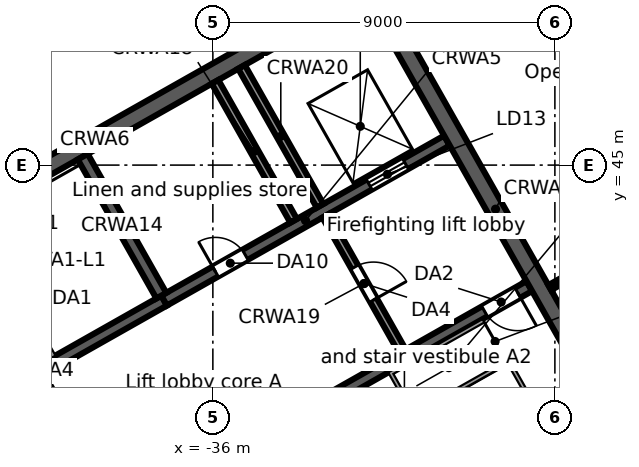
"""IFC4 building model, lengths in metres.
Left out: names, types, materials, properties, quantities, classifications, styles, units other than length and angle.
Written with IfcOpenShell. Run it as: python <this file> out.ifc"""

import sys

from ifc_helpers import new_model, si_unit, direction, frame, frame_2d, origin, place, context, subcontext, project, spatial, rectangle, extrude, element, fill, save


model = new_model("IFC4")
c1 = context("Model", 3, precision=1e-05, world=origin(), true_north=direction((0.0, 1.0)))
c2 = subcontext(c1, "Body", "Model", "MODEL_VIEW")
j1 = project(units=[si_unit("LENGTHUNIT", "METRE"), si_unit("PLANEANGLEUNIT", "RADIAN")], contexts=[c1])
p1 = place(None, origin())
s1 = spatial("IfcSite", under=j1, at=p1, CompositionType="ELEMENT")
p2 = place(p1, origin())
s2 = spatial("IfcBuilding", under=s1, at=p2, CompositionType="ELEMENT")
p3 = place(p2, frame((0.0, 0.0, 238.7)))
s3 = spatial("IfcBuildingStorey", under=s2, at=p3, CompositionType="ELEMENT", Elevation=238.7)
p4 = place(p3, frame((-0.046, 47.974, 0.0), z_axis=(0.0, 0.0, 1.0), x_axis=(-0.870356579543, -0.492421998337, 0.0)))
e1 = element("IfcWall", 1, at=p4, inside=s3, PredefinedType="STANDARD", context=c2, shape_type="SweptSolid", body=[
    extrude(rectangle(XDim=43.754, YDim=0.25, at=frame_2d((21.877, 0.0))), origin(), (0.0, 0.0, 1.0), 3.62),
])
p5 = place(p4, frame((41.061, 0.0, 0.8)))
e2 = element("IfcOpeningElement", 2, at=p5, cuts=e1, PredefinedType="OPENING", context=c2, shape_type="SweptSolid", body=[
    extrude(rectangle(XDim=2.4, YDim=2.2, at=frame_2d((1.2, 1.1))), frame((0.0, 0.135, 0.0), z_axis=(0.0, -1.0, 0.0), x_axis=(1.0, 0.0, 0.0)), (0.0, 0.0, 1.0), 0.27),
])
p6 = place(p4, frame((38.443, 0.0, 0.0)))
e3 = element("IfcOpeningElement", 3, at=p6, cuts=e1, PredefinedType="OPENING", context=c2, shape_type="SweptSolid", body=[
    extrude(rectangle(XDim=1.8, YDim=2.4, at=frame_2d((0.9, 1.2))), frame((0.0, 0.135, 0.0), z_axis=(0.0, -1.0, 0.0), x_axis=(1.0, 0.0, 0.0)), (0.0, 0.0, 1.0), 0.27),
])
p7 = place(p4, frame((35.225, 0.0, 0.8)))
e4 = element("IfcOpeningElement", 4, at=p7, cuts=e1, PredefinedType="OPENING", context=c2, shape_type="SweptSolid", body=[
    extrude(rectangle(XDim=2.4, YDim=2.2, at=frame_2d((1.2, 1.1))), frame((0.0, 0.135, 0.0), z_axis=(0.0, -1.0, 0.0), x_axis=(1.0, 0.0, 0.0)), (0.0, 0.0, 1.0), 0.27),
])
p8 = place(p4, frame((32.307, 0.0, 0.8)))
e5 = element("IfcOpeningElement", 5, at=p8, cuts=e1, PredefinedType="OPENING", context=c2, shape_type="SweptSolid", body=[
    extrude(rectangle(XDim=2.4, YDim=2.2, at=frame_2d((1.2, 1.1))), frame((0.0, 0.135, 0.0), z_axis=(0.0, -1.0, 0.0), x_axis=(1.0, 0.0, 0.0)), (0.0, 0.0, 1.0), 0.27),
])
p9 = place(p4, frame((29.688, 0.0, 0.0)))
e6 = element("IfcOpeningElement", 6, at=p9, cuts=e1, PredefinedType="OPENING", context=c2, shape_type="SweptSolid", body=[
    extrude(rectangle(XDim=1.8, YDim=2.4, at=frame_2d((0.9, 1.2))), frame((0.0, 0.135, 0.0), z_axis=(0.0, -1.0, 0.0), x_axis=(1.0, 0.0, 0.0)), (0.0, 0.0, 1.0), 0.27),
])
p10 = place(p4, frame((26.47, 0.0, 0.8)))
e7 = element("IfcOpeningElement", 7, at=p10, cuts=e1, PredefinedType="OPENING", context=c2, shape_type="SweptSolid", body=[
    extrude(rectangle(XDim=2.4, YDim=2.2, at=frame_2d((1.2, 1.1))), frame((0.0, 0.135, 0.0), z_axis=(0.0, -1.0, 0.0), x_axis=(1.0, 0.0, 0.0)), (0.0, 0.0, 1.0), 0.27),
])
p11 = place(p4, frame((23.552, 0.0, 0.8)))
e8 = element("IfcOpeningElement", 8, at=p11, cuts=e1, PredefinedType="OPENING", context=c2, shape_type="SweptSolid", body=[
    extrude(rectangle(XDim=2.4, YDim=2.2, at=frame_2d((1.2, 1.1))), frame((0.0, 0.135, 0.0), z_axis=(0.0, -1.0, 0.0), x_axis=(1.0, 0.0, 0.0)), (0.0, 0.0, 1.0), 0.27),
])
p12 = place(p4, frame((20.934, 0.0, 0.0)))
e9 = element("IfcOpeningElement", 9, at=p12, cuts=e1, PredefinedType="OPENING", context=c2, shape_type="SweptSolid", body=[
    extrude(rectangle(XDim=1.8, YDim=2.4, at=frame_2d((0.9, 1.2))), frame((0.0, 0.135, 0.0), z_axis=(0.0, -1.0, 0.0), x_axis=(1.0, 0.0, 0.0)), (0.0, 0.0, 1.0), 0.27),
])
p13 = place(p4, frame((17.716, 0.0, 0.8)))
e10 = element("IfcOpeningElement", 10, at=p13, cuts=e1, PredefinedType="OPENING", context=c2, shape_type="SweptSolid", body=[
    extrude(rectangle(XDim=2.4, YDim=2.2, at=frame_2d((1.2, 1.1))), frame((0.0, 0.135, 0.0), z_axis=(0.0, -1.0, 0.0), x_axis=(1.0, 0.0, 0.0)), (0.0, 0.0, 1.0), 0.27),
])
p14 = place(p4, frame((14.798, 0.0, 0.8)))
e11 = element("IfcOpeningElement", 11, at=p14, cuts=e1, PredefinedType="OPENING", context=c2, shape_type="SweptSolid", body=[
    extrude(rectangle(XDim=2.4, YDim=2.2, at=frame_2d((1.2, 1.1))), frame((0.0, 0.135, 0.0), z_axis=(0.0, -1.0, 0.0), x_axis=(1.0, 0.0, 0.0)), (0.0, 0.0, 1.0), 0.27),
])
p15 = place(p4, frame((12.179, 0.0, 0.0)))
e12 = element("IfcOpeningElement", 12, at=p15, cuts=e1, PredefinedType="OPENING", context=c2, shape_type="SweptSolid", body=[
    extrude(rectangle(XDim=1.8, YDim=2.4, at=frame_2d((0.9, 1.2))), frame((0.0, 0.135, 0.0), z_axis=(0.0, -1.0, 0.0), x_axis=(1.0, 0.0, 0.0)), (0.0, 0.0, 1.0), 0.27),
])
p16 = place(p4, frame((8.961, 0.0, 0.8)))
e13 = element("IfcOpeningElement", 13, at=p16, cuts=e1, PredefinedType="OPENING", context=c2, shape_type="SweptSolid", body=[
    extrude(rectangle(XDim=2.4, YDim=2.2, at=frame_2d((1.2, 1.1))), frame((0.0, 0.135, 0.0), z_axis=(0.0, -1.0, 0.0), x_axis=(1.0, 0.0, 0.0)), (0.0, 0.0, 1.0), 0.27),
])
p17 = place(p4, frame((6.043, 0.0, 0.8)))
e14 = element("IfcOpeningElement", 14, at=p17, cuts=e1, PredefinedType="OPENING", context=c2, shape_type="SweptSolid", body=[
    extrude(rectangle(XDim=2.4, YDim=2.2, at=frame_2d((1.2, 1.1))), frame((0.0, 0.135, 0.0), z_axis=(0.0, -1.0, 0.0), x_axis=(1.0, 0.0, 0.0)), (0.0, 0.0, 1.0), 0.27),
])
p18 = place(p4, frame((3.425, 0.0, 0.0)))
e15 = element("IfcOpeningElement", 15, at=p18, cuts=e1, PredefinedType="OPENING", context=c2, shape_type="SweptSolid", body=[
    extrude(rectangle(XDim=1.8, YDim=2.4, at=frame_2d((0.9, 1.2))), frame((0.0, 0.135, 0.0), z_axis=(0.0, -1.0, 0.0), x_axis=(1.0, 0.0, 0.0)), (0.0, 0.0, 1.0), 0.27),
])
p19 = place(p4, frame((0.207, 0.0, 0.8)))
e16 = element("IfcOpeningElement", 16, at=p19, cuts=e1, PredefinedType="OPENING", context=c2, shape_type="SweptSolid", body=[
    extrude(rectangle(XDim=2.4, YDim=2.2, at=frame_2d((1.2, 1.1))), frame((0.0, 0.135, 0.0), z_axis=(0.0, -1.0, 0.0), x_axis=(1.0, 0.0, 0.0)), (0.0, 0.0, 1.0), 0.27),
])
p20 = place(p3, frame((-58.732, 38.771, 0.0), z_axis=(0.0, 0.0, 1.0), x_axis=(0.870354824205, 0.492425100887, 0.0)))
e17 = element("IfcWall", 17, at=p20, inside=s3, PredefinedType="STANDARD", context=c2, shape_type="SweptSolid", body=[
    extrude(rectangle(XDim=64.006, YDim=0.25, at=frame_2d((32.003, 0.0))), origin(), (0.0, 0.0, 1.0), 3.62),
])
p21 = place(p20, frame((61.259, 0.0, 0.8)))
e18 = element("IfcOpeningElement", 18, at=p21, cuts=e17, PredefinedType="OPENING", context=c2, shape_type="SweptSolid", body=[
    extrude(rectangle(XDim=2.4, YDim=2.2, at=frame_2d((1.2, 1.1))), frame((0.0, 0.135, 0.0), z_axis=(0.0, -1.0, 0.0), x_axis=(1.0, 0.0, 0.0)), (0.0, 0.0, 1.0), 0.27),
])
p22 = place(p20, frame((58.216, 0.0, 0.8)))
e19 = element("IfcOpeningElement", 19, at=p22, cuts=e17, PredefinedType="OPENING", context=c2, shape_type="SweptSolid", body=[
    extrude(rectangle(XDim=2.4, YDim=2.2, at=frame_2d((1.2, 1.1))), frame((0.0, 0.135, 0.0), z_axis=(0.0, -1.0, 0.0), x_axis=(1.0, 0.0, 0.0)), (0.0, 0.0, 1.0), 0.27),
])
p23 = place(p20, frame((55.173, 0.0, 0.8)))
e20 = element("IfcOpeningElement", 20, at=p23, cuts=e17, PredefinedType="OPENING", context=c2, shape_type="SweptSolid", body=[
    extrude(rectangle(XDim=2.4, YDim=2.2, at=frame_2d((1.2, 1.1))), frame((0.0, 0.135, 0.0), z_axis=(0.0, -1.0, 0.0), x_axis=(1.0, 0.0, 0.0)), (0.0, 0.0, 1.0), 0.27),
])
p24 = place(p20, frame((52.129, 0.0, 0.8)))
e21 = element("IfcOpeningElement", 21, at=p24, cuts=e17, PredefinedType="OPENING", context=c2, shape_type="SweptSolid", body=[
    extrude(rectangle(XDim=2.4, YDim=2.2, at=frame_2d((1.2, 1.1))), frame((0.0, 0.135, 0.0), z_axis=(0.0, -1.0, 0.0), x_axis=(1.0, 0.0, 0.0)), (0.0, 0.0, 1.0), 0.27),
])
p25 = place(p20, frame((49.086, 0.0, 0.8)))
e22 = element("IfcOpeningElement", 22, at=p25, cuts=e17, PredefinedType="OPENING", context=c2, shape_type="SweptSolid", body=[
    extrude(rectangle(XDim=2.4, YDim=2.2, at=frame_2d((1.2, 1.1))), frame((0.0, 0.135, 0.0), z_axis=(0.0, -1.0, 0.0), x_axis=(1.0, 0.0, 0.0)), (0.0, 0.0, 1.0), 0.27),
])
p26 = place(p20, frame((46.043, 0.0, 0.8)))
e23 = element("IfcOpeningElement", 23, at=p26, cuts=e17, PredefinedType="OPENING", context=c2, shape_type="SweptSolid", body=[
    extrude(rectangle(XDim=2.4, YDim=2.2, at=frame_2d((1.2, 1.1))), frame((0.0, 0.135, 0.0), z_axis=(0.0, -1.0, 0.0), x_axis=(1.0, 0.0, 0.0)), (0.0, 0.0, 1.0), 0.27),
])
p27 = place(p20, frame((43.0, 0.0, 0.8)))
e24 = element("IfcOpeningElement", 24, at=p27, cuts=e17, PredefinedType="OPENING", context=c2, shape_type="SweptSolid", body=[
    extrude(rectangle(XDim=2.4, YDim=2.2, at=frame_2d((1.2, 1.1))), frame((0.0, 0.135, 0.0), z_axis=(0.0, -1.0, 0.0), x_axis=(1.0, 0.0, 0.0)), (0.0, 0.0, 1.0), 0.27),
])
p28 = place(p20, frame((39.956, 0.0, 0.8)))
e25 = element("IfcOpeningElement", 25, at=p28, cuts=e17, PredefinedType="OPENING", context=c2, shape_type="SweptSolid", body=[
    extrude(rectangle(XDim=2.4, YDim=2.2, at=frame_2d((1.2, 1.1))), frame((0.0, 0.135, 0.0), z_axis=(0.0, -1.0, 0.0), x_axis=(1.0, 0.0, 0.0)), (0.0, 0.0, 1.0), 0.27),
])
p29 = place(p20, frame((36.913, 0.0, 0.8)))
e26 = element("IfcOpeningElement", 26, at=p29, cuts=e17, PredefinedType="OPENING", context=c2, shape_type="SweptSolid", body=[
    extrude(rectangle(XDim=2.4, YDim=2.2, at=frame_2d((1.2, 1.1))), frame((0.0, 0.135, 0.0), z_axis=(0.0, -1.0, 0.0), x_axis=(1.0, 0.0, 0.0)), (0.0, 0.0, 1.0), 0.27),
])
p30 = place(p20, frame((33.87, 0.0, 0.8)))
e27 = element("IfcOpeningElement", 27, at=p30, cuts=e17, PredefinedType="OPENING", context=c2, shape_type="SweptSolid", body=[
    extrude(rectangle(XDim=2.4, YDim=2.2, at=frame_2d((1.2, 1.1))), frame((0.0, 0.135, 0.0), z_axis=(0.0, -1.0, 0.0), x_axis=(1.0, 0.0, 0.0)), (0.0, 0.0, 1.0), 0.27),
])
p31 = place(p20, frame((30.826, 0.0, 0.8)))
e28 = element("IfcOpeningElement", 28, at=p31, cuts=e17, PredefinedType="OPENING", context=c2, shape_type="SweptSolid", body=[
    extrude(rectangle(XDim=2.4, YDim=2.2, at=frame_2d((1.2, 1.1))), frame((0.0, 0.135, 0.0), z_axis=(0.0, -1.0, 0.0), x_axis=(1.0, 0.0, 0.0)), (0.0, 0.0, 1.0), 0.27),
])
p32 = place(p20, frame((27.783, 0.0, 0.8)))
e29 = element("IfcOpeningElement", 29, at=p32, cuts=e17, PredefinedType="OPENING", context=c2, shape_type="SweptSolid", body=[
    extrude(rectangle(XDim=2.4, YDim=2.2, at=frame_2d((1.2, 1.1))), frame((0.0, 0.135, 0.0), z_axis=(0.0, -1.0, 0.0), x_axis=(1.0, 0.0, 0.0)), (0.0, 0.0, 1.0), 0.27),
])
p33 = place(p20, frame((24.74, 0.0, 0.8)))
e30 = element("IfcOpeningElement", 30, at=p33, cuts=e17, PredefinedType="OPENING", context=c2, shape_type="SweptSolid", body=[
    extrude(rectangle(XDim=2.4, YDim=2.2, at=frame_2d((1.2, 1.1))), frame((0.0, 0.135, 0.0), z_axis=(0.0, -1.0, 0.0), x_axis=(1.0, 0.0, 0.0)), (0.0, 0.0, 1.0), 0.27),
])
p34 = place(p20, frame((21.696, 0.0, 0.8)))
e31 = element("IfcOpeningElement", 31, at=p34, cuts=e17, PredefinedType="OPENING", context=c2, shape_type="SweptSolid", body=[
    extrude(rectangle(XDim=2.4, YDim=2.2, at=frame_2d((1.2, 1.1))), frame((0.0, 0.135, 0.0), z_axis=(0.0, -1.0, 0.0), x_axis=(1.0, 0.0, 0.0)), (0.0, 0.0, 1.0), 0.27),
])
p35 = place(p20, frame((18.653, 0.0, 0.8)))
e32 = element("IfcOpeningElement", 32, at=p35, cuts=e17, PredefinedType="OPENING", context=c2, shape_type="SweptSolid", body=[
    extrude(rectangle(XDim=2.4, YDim=2.2, at=frame_2d((1.2, 1.1))), frame((0.0, 0.135, 0.0), z_axis=(0.0, -1.0, 0.0), x_axis=(1.0, 0.0, 0.0)), (0.0, 0.0, 1.0), 0.27),
])
p36 = place(p20, frame((15.61, 0.0, 0.8)))
e33 = element("IfcOpeningElement", 33, at=p36, cuts=e17, PredefinedType="OPENING", context=c2, shape_type="SweptSolid", body=[
    extrude(rectangle(XDim=2.4, YDim=2.2, at=frame_2d((1.2, 1.1))), frame((0.0, 0.135, 0.0), z_axis=(0.0, -1.0, 0.0), x_axis=(1.0, 0.0, 0.0)), (0.0, 0.0, 1.0), 0.27),
])
p37 = place(p20, frame((12.567, 0.0, 0.8)))
e34 = element("IfcOpeningElement", 34, at=p37, cuts=e17, PredefinedType="OPENING", context=c2, shape_type="SweptSolid", body=[
    extrude(rectangle(XDim=2.4, YDim=2.2, at=frame_2d((1.2, 1.1))), frame((0.0, 0.135, 0.0), z_axis=(0.0, -1.0, 0.0), x_axis=(1.0, 0.0, 0.0)), (0.0, 0.0, 1.0), 0.27),
])
p38 = place(p20, frame((9.523, 0.0, 0.8)))
e35 = element("IfcOpeningElement", 35, at=p38, cuts=e17, PredefinedType="OPENING", context=c2, shape_type="SweptSolid", body=[
    extrude(rectangle(XDim=2.4, YDim=2.2, at=frame_2d((1.2, 1.1))), frame((0.0, 0.135, 0.0), z_axis=(0.0, -1.0, 0.0), x_axis=(1.0, 0.0, 0.0)), (0.0, 0.0, 1.0), 0.27),
])
p39 = place(p20, frame((6.48, 0.0, 0.8)))
e36 = element("IfcOpeningElement", 36, at=p39, cuts=e17, PredefinedType="OPENING", context=c2, shape_type="SweptSolid", body=[
    extrude(rectangle(XDim=2.4, YDim=2.2, at=frame_2d((1.2, 1.1))), frame((0.0, 0.135, 0.0), z_axis=(0.0, -1.0, 0.0), x_axis=(1.0, 0.0, 0.0)), (0.0, 0.0, 1.0), 0.27),
])
p40 = place(p20, frame((3.437, 0.0, 0.8)))
e37 = element("IfcOpeningElement", 37, at=p40, cuts=e17, PredefinedType="OPENING", context=c2, shape_type="SweptSolid", body=[
    extrude(rectangle(XDim=2.4, YDim=2.2, at=frame_2d((1.2, 1.1))), frame((0.0, 0.135, 0.0), z_axis=(0.0, -1.0, 0.0), x_axis=(1.0, 0.0, 0.0)), (0.0, 0.0, 1.0), 0.27),
])
p41 = place(p20, frame((0.393, 0.0, 0.8)))
e38 = element("IfcOpeningElement", 38, at=p41, cuts=e17, PredefinedType="OPENING", context=c2, shape_type="SweptSolid", body=[
    extrude(rectangle(XDim=2.4, YDim=2.2, at=frame_2d((1.2, 1.1))), frame((0.0, 0.135, 0.0), z_axis=(0.0, -1.0, 0.0), x_axis=(1.0, 0.0, 0.0)), (0.0, 0.0, 1.0), 0.27),
])
p42 = place(p3, frame((-34.245, 38.097, 0.0), z_axis=(0.0, 0.0, 1.0), x_axis=(0.870360409231, 0.492415229297, 0.0)))
e39 = element("IfcWall", 39, at=p42, inside=s3, PredefinedType="SOLIDWALL", context=c2, shape_type="SweptSolid", body=[
    extrude(rectangle(XDim=7.55, YDim=0.3, at=frame_2d((3.775, 0.0))), origin(), (0.0, 0.0, 1.0), 3.62),
])
p43 = place(p42, frame((6.2, 0.0, 0.0)))
e40 = element("IfcOpeningElement", 40, at=p43, cuts=e39, PredefinedType="OPENING", context=c2, shape_type="SweptSolid", body=[
    extrude(rectangle(XDim=1.0, YDim=2.1, at=frame_2d((0.5, 1.05))), frame((0.0, 0.16, 0.0), z_axis=(0.0, -1.0, 0.0), x_axis=(1.0, 0.0, 0.0)), (0.0, 0.0, 1.0), 0.32),
])
p44 = place(p3, frame((-43.853, 37.717, 0.0), z_axis=(0.0, 0.0, 1.0), x_axis=(0.870360409231, 0.492415229297, 0.0)))
e41 = element("IfcWall", 41, at=p44, inside=s3, PredefinedType="SOLIDWALL", context=c2, shape_type="SweptSolid", body=[
    extrude(rectangle(XDim=7.55, YDim=0.3, at=frame_2d((3.775, 0.0))), origin(), (0.0, 0.0, 1.0), 3.62),
])
p45 = place(p44, frame((0.35, 0.0, 0.0)))
e42 = element("IfcOpeningElement", 42, at=p45, cuts=e41, PredefinedType="OPENING", context=c2, shape_type="SweptSolid", body=[
    extrude(rectangle(XDim=1.0, YDim=2.1, at=frame_2d((0.5, 1.05))), frame((0.0, 0.16, 0.0), z_axis=(0.0, -1.0, 0.0), x_axis=(1.0, 0.0, 0.0)), (0.0, 0.0, 1.0), 0.32),
])
p46 = place(p3, frame((-37.282, 41.435, 0.0), z_axis=(0.0, 0.0, 1.0), x_axis=(0.870352688754, 0.492428875248, 0.0)))
e43 = element("IfcWall", 43, at=p46, inside=s3, PredefinedType="SOLIDWALL", context=c2, shape_type="SweptSolid", body=[
    extrude(rectangle(XDim=8.55, YDim=0.3, at=frame_2d((4.275, 0.0))), origin(), (0.0, 0.0, 1.0), 3.62),
])
p47 = place(p46, frame((6.2, 0.0, 0.0)))
e44 = element("IfcOpeningElement", 44, at=p47, cuts=e43, PredefinedType="OPENING", context=c2, shape_type="SweptSolid", body=[
    extrude(rectangle(XDim=1.1, YDim=2.1, at=frame_2d((0.55, 1.05))), frame((0.0, 0.16, 0.0), z_axis=(0.0, -1.0, 0.0), x_axis=(1.0, 0.0, 0.0)), (0.0, 0.0, 1.0), 0.32),
])
p48 = place(p46, frame((1.55, 0.0, 0.0)))
e45 = element("IfcOpeningElement", 45, at=p48, cuts=e43, PredefinedType="OPENING", context=c2, shape_type="SweptSolid", body=[
    extrude(rectangle(XDim=0.9, YDim=2.1, at=frame_2d((0.45, 1.05))), frame((0.0, 0.16, 0.0), z_axis=(0.0, -1.0, 0.0), x_axis=(1.0, 0.0, 0.0)), (0.0, 0.0, 1.0), 0.32),
])
p49 = place(p3, frame((-46.498, 41.477, 0.0), z_axis=(0.0, 0.0, 1.0), x_axis=(0.870359753402, 0.492416388494, 0.0)))
e46 = element("IfcWall", 46, at=p49, inside=s3, PredefinedType="SOLIDWALL", context=c2, shape_type="SweptSolid", body=[
    extrude(rectangle(XDim=17.0, YDim=0.45, at=frame_2d((8.5, 0.0))), origin(), (0.0, 0.0, 1.0), 3.62),
])
p50 = place(p3, frame((-46.191, 41.392, 0.0), z_axis=(0.0, 0.0, 1.0), x_axis=(0.492421378713, -0.870356930107, 0.0)))
e47 = element("IfcWall", 47, at=p50, inside=s3, PredefinedType="SOLIDWALL", context=c2, shape_type="SweptSolid", body=[
    extrude(rectangle(XDim=13.1, YDim=0.45, at=frame_2d((6.55, 0.0))), origin(), (0.0, 0.0, 1.0), 3.62),
])
p51 = place(p3, frame((-40.516, 39.433, 0.0), z_axis=(0.0, 0.0, 1.0), x_axis=(0.492453559952, -0.87033872216, 0.0)))
e48 = element("IfcWall", 48, at=p51, inside=s3, PredefinedType="PARTITIONING", context=c2, shape_type="SweptSolid", body=[
    extrude(rectangle(XDim=4.1, YDim=0.2, at=frame_2d((2.05, 0.0))), origin(), (0.0, 0.0, 1.0), 3.62),
])
p52 = place(p51, frame((1.55, 0.0, 0.0)))
e49 = element("IfcOpeningElement", 49, at=p52, cuts=e48, PredefinedType="OPENING", context=c2, shape_type="SweptSolid", body=[
    extrude(rectangle(XDim=1.0, YDim=2.1, at=frame_2d((0.5, 1.05))), frame((0.0, 0.11, 0.0), z_axis=(0.0, -1.0, 0.0), x_axis=(1.0, 0.0, 0.0)), (0.0, 0.0, 1.0), 0.22),
])
p53 = place(p3, frame((-39.424, 45.22, 0.0), z_axis=(0.0, 0.0, 1.0), x_axis=(0.492409653846, -0.870363563575, 0.0)))
e50 = element("IfcWall", 50, at=p53, inside=s3, PredefinedType="SOLIDWALL", context=c2, shape_type="SweptSolid", body=[
    extrude(rectangle(XDim=4.2, YDim=0.3, at=frame_2d((2.1, 0.0))), origin(), (0.0, 0.0, 1.0), 3.62),
])
p54 = place(p3, frame((-35.943, 47.19, 0.0), z_axis=(0.0, 0.0, 1.0), x_axis=(0.492409653846, -0.870363563575, 0.0)))
e51 = element("IfcWall", 51, at=p54, inside=s3, PredefinedType="SOLIDWALL", context=c2, shape_type="SweptSolid", body=[
    extrude(rectangle(XDim=4.2, YDim=0.2, at=frame_2d((2.1, 0.0))), origin(), (0.0, 0.0, 1.0), 3.62),
])
p55 = place(p3, frame((-33.031, 43.667, 0.0), z_axis=(0.0, 0.0, 1.0), x_axis=(0.492408451753, -0.87036424366, 0.0)))
e52 = element("IfcWall", 52, at=p55, inside=s3, PredefinedType="PARTITIONING", context=c2, shape_type="SweptSolid", body=[
    extrude(rectangle(XDim=4.1, YDim=0.2, at=frame_2d((2.05, 0.0))), origin(), (0.0, 0.0, 1.0), 3.62),
])
p56 = place(p55, frame((1.55, 0.0, 0.0)))
e53 = element("IfcOpeningElement", 53, at=p56, cuts=e52, PredefinedType="OPENING", context=c2, shape_type="SweptSolid", body=[
    extrude(rectangle(XDim=1.0, YDim=2.1, at=frame_2d((0.5, 1.05))), frame((0.0, 0.11, 0.0), z_axis=(0.0, -1.0, 0.0), x_axis=(1.0, 0.0, 0.0)), (0.0, 0.0, 1.0), 0.22),
])
p57 = place(p3, frame((-35.246, 47.584, 0.0), z_axis=(0.0, 0.0, 1.0), x_axis=(0.492409653846, -0.870363563575, 0.0)))
e54 = element("IfcWall", 54, at=p57, inside=s3, PredefinedType="SOLIDWALL", context=c2, shape_type="SweptSolid", body=[
    extrude(rectangle(XDim=4.2, YDim=0.2, at=frame_2d((2.1, 0.0))), origin(), (0.0, 0.0, 1.0), 3.62),
])
p58 = place(p3, frame((-31.787, 49.542, 0.0), z_axis=(0.0, 0.0, 1.0), x_axis=(0.492421378713, -0.870356930107, 0.0)))
e55 = element("IfcWall", 55, at=p58, inside=s3, PredefinedType="SOLIDWALL", context=c2, shape_type="SweptSolid", body=[
    extrude(rectangle(XDim=13.1, YDim=0.45, at=frame_2d((6.55, 0.0))), origin(), (0.0, 0.0, 1.0), 3.62),
])
p59 = place(p3, frame((-27.134, 41.776, 0.0), z_axis=(0.0, 0.0, 1.0), x_axis=(0.870285818058, 0.4925470484, 0.0)))
e56 = element("IfcWall", 56, at=p59, inside=s3, PredefinedType="PARTITIONING", context=c2, shape_type="SweptSolid", body=[
    extrude(rectangle(XDim=2.25, YDim=0.15, at=frame_2d((1.125, 0.0))), origin(), (0.0, 0.0, 1.0), 2.892),
])
p60 = place(p47, origin())
e57 = element("IfcDoor", 57, at=p60, inside=s3, OperationType="DOUBLE_DOOR_SLIDING", PredefinedType="DOOR", context=c2, shape_type="SweptSolid", body=[
    extrude(rectangle(XDim=1.1, YDim=2.1, at=frame_2d((0.55, 1.05))), frame((0.0, 0.025, 0.0), z_axis=(0.0, -1.0, 0.0), x_axis=(1.0, 0.0, 0.0)), (0.0, 0.0, 1.0), 0.05),
])
fill(e44, e57)
p61 = place(p43, frame((1.0, 0.0, 0.0), z_axis=(0.0, 0.0, 1.0), x_axis=(-1.0, 0.0, 0.0)))
e58 = element("IfcDoor", 58, at=p61, inside=s3, OperationType="SINGLE_SWING_LEFT", PredefinedType="DOOR", context=c2, shape_type="SweptSolid", body=[
    extrude(rectangle(XDim=1.0, YDim=2.1, at=frame_2d((0.5, 1.05))), frame((0.0, 0.025, 0.0), z_axis=(0.0, -1.0, 0.0), x_axis=(1.0, 0.0, 0.0)), (0.0, 0.0, 1.0), 0.05),
])
fill(e40, e58)
p62 = place(p56, origin())
e59 = element("IfcDoor", 59, at=p62, inside=s3, OperationType="SINGLE_SWING_RIGHT", PredefinedType="DOOR", context=c2, shape_type="SweptSolid", body=[
    extrude(rectangle(XDim=1.0, YDim=2.1, at=frame_2d((0.5, 1.05))), frame((0.0, 0.025, 0.0), z_axis=(0.0, -1.0, 0.0), x_axis=(1.0, 0.0, 0.0)), (0.0, 0.0, 1.0), 0.05),
])
fill(e53, e59)
p63 = place(p48, origin())
e60 = element("IfcDoor", 60, at=p63, inside=s3, OperationType="SINGLE_SWING_LEFT", PredefinedType="DOOR", context=c2, shape_type="SweptSolid", body=[
    extrude(rectangle(XDim=0.9, YDim=2.1, at=frame_2d((0.45, 1.05))), frame((0.0, 0.025, 0.0), z_axis=(0.0, -1.0, 0.0), x_axis=(1.0, 0.0, 0.0)), (0.0, 0.0, 1.0), 0.05),
])
fill(e45, e60)
save(model, sys.argv[1])
